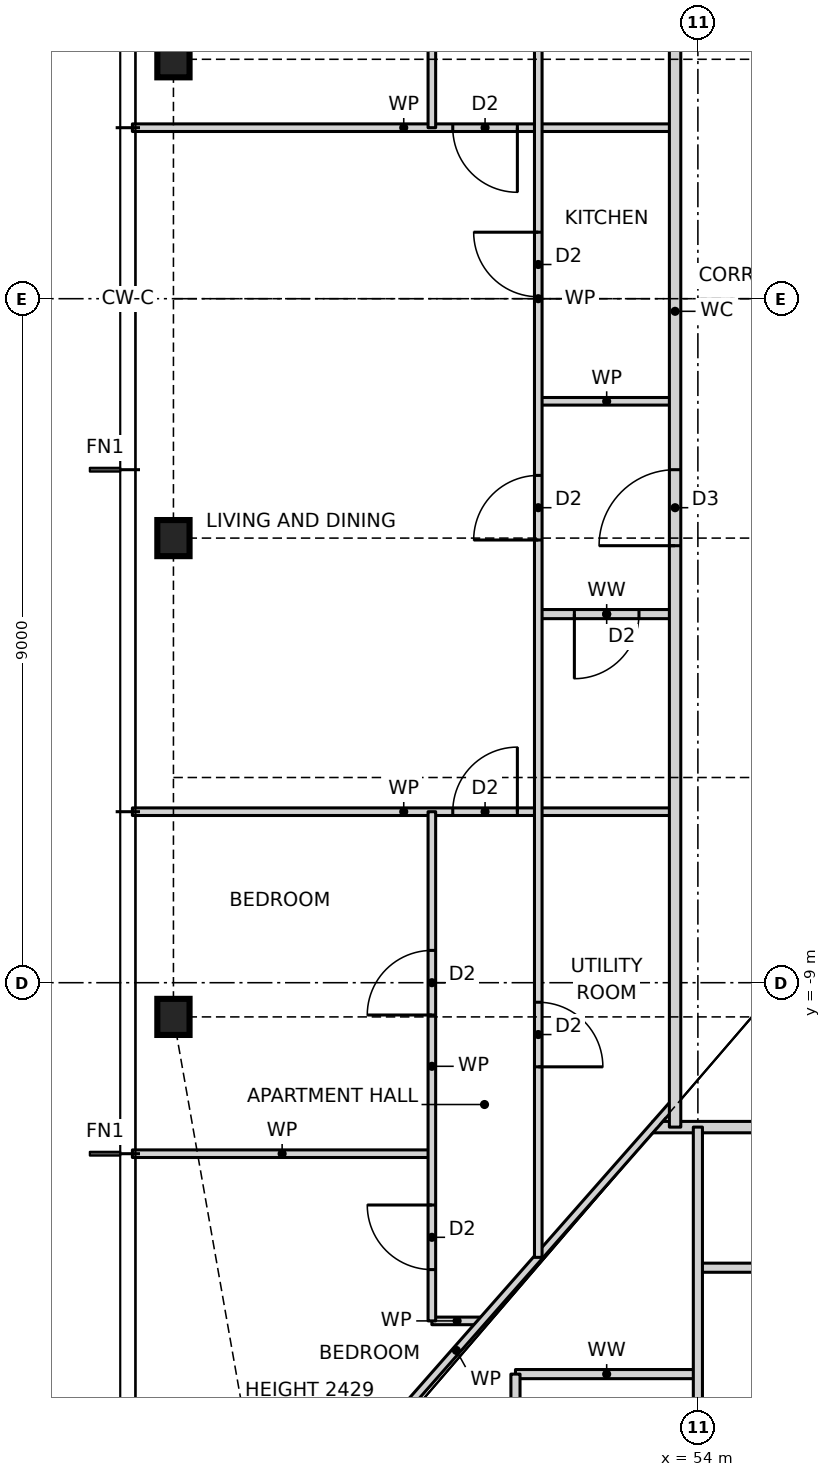
"""IFC4 building model, lengths in metres.
Left out: names, types, materials, properties, quantities, classifications, styles, units other than length and angle.
Written with IfcOpenShell. Run it as: python <this file> out.ifc"""

import sys

from ifc_helpers import new_model, si_unit, direction, frame, frame_2d, origin, origin_2d, place, context, subcontext, project, spatial, rectangle, i_section, extrude, element, fill, save


model = new_model("IFC4")
c1 = context("Model", 3, precision=1e-05, world=origin(), true_north=direction((0.0, 1.0)))
c2 = subcontext(c1, "Body", "Model", "MODEL_VIEW")
j1 = project(units=[si_unit("LENGTHUNIT", "METRE"), si_unit("PLANEANGLEUNIT", "RADIAN")], contexts=[c1])
p1 = place(None, origin())
s1 = spatial("IfcSite", under=j1, at=p1, CompositionType="ELEMENT")
p2 = place(p1, origin())
s2 = spatial("IfcBuilding", under=s1, at=p2, CompositionType="ELEMENT")
p3 = place(p2, frame((0.0, 0.0, 18.5)))
s3 = spatial("IfcBuildingStorey", under=s2, at=p3, CompositionType="ELEMENT", Elevation=18.5)
for number, where, z_axis, x_axis in (
    (1, (47.1, 3.15, 0.0), (0.0, 0.0, 1.0), (1.0, 0.0, 0.0)),
    (2, (47.1, -3.15, 0.0), (0.0, 0.0, 1.0), (1.0, 0.0, 0.0)),
    (3, (47.1, -9.45, 0.0), (0.0, 0.0, 1.0), (1.0, 0.0, 0.0)),
):
    element("IfcColumn", number, at=place(p3, frame(where, z_axis=z_axis, x_axis=x_axis)), inside=s3, PredefinedType="COLUMN", context=c2, shape_type="SweptSolid", body=[
        extrude(i_section(OverallWidth=0.424, OverallDepth=0.475, WebThickness=0.048, FlangeThickness=0.077, at=origin_2d()), origin(), (0.0, 0.0, 1.0), 3.5),
    ])
p4 = place(p3, frame((51.6, -14.15, 0.0), z_axis=(0.0, 0.0, 1.0), x_axis=(1.0, 0.0, 0.0)))
e4 = element("IfcWall", 4, at=p4, inside=s3, PredefinedType="PARTITIONING", context=c2, shape_type="SweptSolid", body=[
    extrude(rectangle(XDim=2.4, YDim=0.12, at=frame_2d((1.2, 0.0))), origin(), (0.0, 0.0, 1.0), 3.27),
])
p5 = place(p3, frame((50.5, -13.45, 0.0), z_axis=(0.0, 0.0, 1.0), x_axis=(1.0, 0.0, 0.0)))
e5 = element("IfcWall", 5, at=p5, inside=s3, PredefinedType="PARTITIONING", context=c2, shape_type="SweptSolid", body=[
    extrude(rectangle(XDim=0.664, YDim=0.1, at=frame_2d((0.332, 0.0))), origin(), (0.0, 0.0, 1.0), 3.27),
])
p6 = place(p3, frame((54.0, -12.75, 0.0), z_axis=(0.0, 0.0, 1.0), x_axis=(1.0, 0.0, 0.0)))
e6 = element("IfcWall", 6, at=p6, inside=s3, PredefinedType="PARTITIONING", context=c2, shape_type="SweptSolid", body=[
    extrude(rectangle(XDim=20.2, YDim=0.12, at=frame_2d((10.1, 0.0))), origin(), (0.0, 0.0, 1.0), 3.27),
])
p7 = place(p6, frame((1.375, 0.0, 0.0)))
e7 = element("IfcOpeningElement", 7, at=p7, cuts=e6, PredefinedType="OPENING", context=c2, shape_type="SweptSolid", body=[
    extrude(rectangle(XDim=0.85, YDim=2.1, at=frame_2d((0.425, 1.05))), frame((0.0, 0.07, 0.0), z_axis=(0.0, -1.0, 0.0), x_axis=(1.0, 0.0, 0.0)), (0.0, 0.0, 1.0), 0.14),
])
p8 = place(p6, frame((4.575, 0.0, 0.0)))
e8 = element("IfcOpeningElement", 8, at=p8, cuts=e6, PredefinedType="OPENING", context=c2, shape_type="SweptSolid", body=[
    extrude(rectangle(XDim=0.85, YDim=2.1, at=frame_2d((0.425, 1.05))), frame((0.0, 0.07, 0.0), z_axis=(0.0, -1.0, 0.0), x_axis=(1.0, 0.0, 0.0)), (0.0, 0.0, 1.0), 0.14),
])
p9 = place(p6, frame((10.725, 0.0, 0.0)))
e9 = element("IfcOpeningElement", 9, at=p9, cuts=e6, PredefinedType="OPENING", context=c2, shape_type="SweptSolid", body=[
    extrude(rectangle(XDim=0.85, YDim=2.1, at=frame_2d((0.425, 1.05))), frame((0.0, 0.07, 0.0), z_axis=(0.0, -1.0, 0.0), x_axis=(1.0, 0.0, 0.0)), (0.0, 0.0, 1.0), 0.14),
])
p10 = place(p6, frame((16.325, 0.0, 0.0)))
e10 = element("IfcOpeningElement", 10, at=p10, cuts=e6, PredefinedType="OPENING", context=c2, shape_type="SweptSolid", body=[
    extrude(rectangle(XDim=0.85, YDim=2.1, at=frame_2d((0.425, 1.05))), frame((0.0, 0.07, 0.0), z_axis=(0.0, -1.0, 0.0), x_axis=(1.0, 0.0, 0.0)), (0.0, 0.0, 1.0), 0.14),
])
p11 = place(p3, frame((46.56, -11.25, 0.0), z_axis=(0.0, 0.0, 1.0), x_axis=(1.0, 0.0, 0.0)))
e11 = element("IfcWall", 11, at=p11, inside=s3, PredefinedType="PARTITIONING", context=c2, shape_type="SweptSolid", body=[
    extrude(rectangle(XDim=3.94, YDim=0.1, at=frame_2d((1.97, 0.0))), origin(), (0.0, 0.0, 1.0), 3.27),
])
p12 = place(p3, frame((53.408, -10.9, 0.0), z_axis=(0.0, 0.0, 1.0), x_axis=(1.0, 0.0, 0.0)))
e12 = element("IfcWall", 12, at=p12, inside=s3, PredefinedType="PARTITIONING", context=c2, shape_type="SweptSolid", body=[
    extrude(rectangle(XDim=19.184, YDim=0.15, at=frame_2d((9.592, 0.0))), origin(), (0.0, 0.0, 1.0), 3.27),
])
p13 = place(p12, frame((5.092, 0.0, 0.0)))
e13 = element("IfcOpeningElement", 13, at=p13, cuts=e12, PredefinedType="OPENING", context=c2, shape_type="SweptSolid", body=[
    extrude(rectangle(XDim=1.0, YDim=2.1, at=frame_2d((0.5, 1.05))), frame((0.0, 0.085, 0.0), z_axis=(0.0, -1.0, 0.0), x_axis=(1.0, 0.0, 0.0)), (0.0, 0.0, 1.0), 0.17),
])
p14 = place(p3, frame((46.56, -6.75, 0.0), z_axis=(0.0, 0.0, 1.0), x_axis=(1.0, 0.0, 0.0)))
e14 = element("IfcWall", 14, at=p14, inside=s3, PredefinedType="PARTITIONING", context=c2, shape_type="SweptSolid", body=[
    extrude(rectangle(XDim=7.14, YDim=0.1, at=frame_2d((3.57, 0.0))), origin(), (0.0, 0.0, 1.0), 3.27),
])
p15 = place(p14, frame((4.215, 0.0, 0.0)))
e15 = element("IfcOpeningElement", 15, at=p15, cuts=e14, PredefinedType="OPENING", context=c2, shape_type="SweptSolid", body=[
    extrude(rectangle(XDim=0.85, YDim=2.1, at=frame_2d((0.425, 1.05))), frame((0.0, 0.06, 0.0), z_axis=(0.0, -1.0, 0.0), x_axis=(1.0, 0.0, 0.0)), (0.0, 0.0, 1.0), 0.12),
])
p16 = place(p3, frame((51.9, -4.15, 0.0), z_axis=(0.0, 0.0, 1.0), x_axis=(1.0, 0.0, 0.0)))
e16 = element("IfcWall", 16, at=p16, inside=s3, PredefinedType="PARTITIONING", context=c2, shape_type="SweptSolid", body=[
    extrude(rectangle(XDim=1.8, YDim=0.12, at=frame_2d((0.9, 0.0))), origin(), (0.0, 0.0, 1.0), 3.27),
])
p17 = place(p16, frame((0.475, 0.0, 0.0)))
e17 = element("IfcOpeningElement", 17, at=p17, cuts=e16, PredefinedType="OPENING", context=c2, shape_type="SweptSolid", body=[
    extrude(rectangle(XDim=0.85, YDim=2.1, at=frame_2d((0.425, 1.05))), frame((0.0, 0.07, 0.0), z_axis=(0.0, -1.0, 0.0), x_axis=(1.0, 0.0, 0.0)), (0.0, 0.0, 1.0), 0.14),
])
p18 = place(p3, frame((51.9, -1.35, 0.0), z_axis=(0.0, 0.0, 1.0), x_axis=(1.0, 0.0, 0.0)))
e18 = element("IfcWall", 18, at=p18, inside=s3, PredefinedType="PARTITIONING", context=c2, shape_type="SweptSolid", body=[
    extrude(rectangle(XDim=1.8, YDim=0.1, at=frame_2d((0.9, 0.0))), origin(), (0.0, 0.0, 1.0), 3.27),
])
p19 = place(p3, frame((46.56, 2.25, 0.0), z_axis=(0.0, 0.0, 1.0), x_axis=(1.0, 0.0, 0.0)))
e19 = element("IfcWall", 19, at=p19, inside=s3, PredefinedType="PARTITIONING", context=c2, shape_type="SweptSolid", body=[
    extrude(rectangle(XDim=7.14, YDim=0.1, at=frame_2d((3.57, 0.0))), origin(), (0.0, 0.0, 1.0), 3.27),
])
p20 = place(p19, frame((4.215, 0.0, 0.0)))
e20 = element("IfcOpeningElement", 20, at=p20, cuts=e19, PredefinedType="OPENING", context=c2, shape_type="SweptSolid", body=[
    extrude(rectangle(XDim=0.85, YDim=2.1, at=frame_2d((0.425, 1.05))), frame((0.0, 0.06, 0.0), z_axis=(0.0, -1.0, 0.0), x_axis=(1.0, 0.0, 0.0)), (0.0, 0.0, 1.0), 0.12),
])
p21 = place(p3, frame((47.944, -17.109, 0.0), z_axis=(0.0, 0.0, 1.0), x_axis=(0.660612734851, 0.750726857487, 0.0)))
e21 = element("IfcWall", 21, at=p21, inside=s3, PredefinedType="PARTITIONING", context=c2, shape_type="SweptSolid", body=[
    extrude(rectangle(XDim=8.713, YDim=0.1, at=frame_2d((4.356, 0.0))), origin(), (0.0, 0.0, 1.0), 2.429),
])
p22 = place(p3, frame((54.0, -18.69, 0.0), z_axis=(0.0, 0.0, 1.0), x_axis=(0.0, 1.0, 0.0)))
e22 = element("IfcWall", 22, at=p22, inside=s3, PredefinedType="PARTITIONING", context=c2, shape_type="SweptSolid", body=[
    extrude(rectangle(XDim=7.79, YDim=0.12, at=frame_2d((3.895, 0.0))), origin(), (0.0, 0.0, 1.0), 3.27),
])
p23 = place(p22, frame((0.99, 0.0, 0.0)))
e23 = element("IfcOpeningElement", 23, at=p23, cuts=e22, PredefinedType="OPENING", context=c2, shape_type="SweptSolid", body=[
    extrude(rectangle(XDim=0.85, YDim=2.1, at=frame_2d((0.425, 1.05))), frame((0.0, 0.07, 0.0), z_axis=(0.0, -1.0, 0.0), x_axis=(1.0, 0.0, 0.0)), (0.0, 0.0, 1.0), 0.14),
])
p24 = place(p3, frame((53.7, -10.9, 0.0), z_axis=(0.0, 0.0, 1.0), x_axis=(0.0, 1.0, 0.0)))
e24 = element("IfcWall", 24, at=p24, inside=s3, PredefinedType="PARTITIONING", context=c2, shape_type="SweptSolid", body=[
    extrude(rectangle(XDim=21.468, YDim=0.15, at=frame_2d((10.734, 0.0))), origin(), (0.0, 0.0, 1.0), 3.27),
])
p25 = place(p24, frame((7.65, 0.0, 0.0)))
e25 = element("IfcOpeningElement", 25, at=p25, cuts=e24, PredefinedType="OPENING", context=c2, shape_type="SweptSolid", body=[
    extrude(rectangle(XDim=1.0, YDim=2.1, at=frame_2d((0.5, 1.05))), frame((0.0, 0.085, 0.0), z_axis=(0.0, -1.0, 0.0), x_axis=(1.0, 0.0, 0.0)), (0.0, 0.0, 1.0), 0.17),
])
p26 = place(p3, frame((51.9, -12.614, 0.0), z_axis=(0.0, 0.0, 1.0), x_axis=(0.0, 1.0, 0.0)))
e26 = element("IfcWall", 26, at=p26, inside=s3, PredefinedType="PARTITIONING", context=c2, shape_type="SweptSolid", body=[
    extrude(rectangle(XDim=25.228, YDim=0.1, at=frame_2d((12.614, 0.0))), origin(), (0.0, 0.0, 1.0), 3.27),
])
p27 = place(p26, frame((12.639, 0.0, 0.0)))
e27 = element("IfcOpeningElement", 27, at=p27, cuts=e26, PredefinedType="OPENING", context=c2, shape_type="SweptSolid", body=[
    extrude(rectangle(XDim=0.85, YDim=2.1, at=frame_2d((0.425, 1.05))), frame((0.0, 0.06, 0.0), z_axis=(0.0, -1.0, 0.0), x_axis=(1.0, 0.0, 0.0)), (0.0, 0.0, 1.0), 0.12),
])
p28 = place(p26, frame((9.439, 0.0, 0.0)))
e28 = element("IfcOpeningElement", 28, at=p28, cuts=e26, PredefinedType="OPENING", context=c2, shape_type="SweptSolid", body=[
    extrude(rectangle(XDim=0.85, YDim=2.1, at=frame_2d((0.425, 1.05))), frame((0.0, 0.06, 0.0), z_axis=(0.0, -1.0, 0.0), x_axis=(1.0, 0.0, 0.0)), (0.0, 0.0, 1.0), 0.12),
])
p29 = place(p26, frame((16.639, 0.0, 0.0)))
e29 = element("IfcOpeningElement", 29, at=p29, cuts=e26, PredefinedType="OPENING", context=c2, shape_type="SweptSolid", body=[
    extrude(rectangle(XDim=0.85, YDim=2.1, at=frame_2d((0.425, 1.05))), frame((0.0, 0.06, 0.0), z_axis=(0.0, -1.0, 0.0), x_axis=(1.0, 0.0, 0.0)), (0.0, 0.0, 1.0), 0.12),
])
p30 = place(p26, frame((21.821, 0.0, 0.0)))
e30 = element("IfcOpeningElement", 30, at=p30, cuts=e26, PredefinedType="OPENING", context=c2, shape_type="SweptSolid", body=[
    extrude(rectangle(XDim=0.85, YDim=2.1, at=frame_2d((0.425, 1.05))), frame((0.0, 0.06, 0.0), z_axis=(0.0, -1.0, 0.0), x_axis=(1.0, 0.0, 0.0)), (0.0, 0.0, 1.0), 0.12),
])
p31 = place(p26, frame((2.507, 0.0, 0.0)))
e31 = element("IfcOpeningElement", 31, at=p31, cuts=e26, PredefinedType="OPENING", context=c2, shape_type="SweptSolid", body=[
    extrude(rectangle(XDim=0.85, YDim=2.1, at=frame_2d((0.425, 1.05))), frame((0.0, 0.06, 0.0), z_axis=(0.0, -1.0, 0.0), x_axis=(1.0, 0.0, 0.0)), (0.0, 0.0, 1.0), 0.12),
])
p32 = place(p3, frame((51.6, -16.75, 0.0), z_axis=(0.0, 0.0, 1.0), x_axis=(0.0, 1.0, 0.0)))
e32 = element("IfcWall", 32, at=p32, inside=s3, PredefinedType="PARTITIONING", context=c2, shape_type="SweptSolid", body=[
    extrude(rectangle(XDim=2.6, YDim=0.12, at=frame_2d((1.3, 0.0))), origin(), (0.0, 0.0, 1.0), 3.27),
])
p33 = place(p32, frame((0.875, 0.0, 0.0)))
e33 = element("IfcOpeningElement", 33, at=p33, cuts=e32, PredefinedType="OPENING", context=c2, shape_type="SweptSolid", body=[
    extrude(rectangle(XDim=0.85, YDim=2.1, at=frame_2d((0.425, 1.05))), frame((0.0, 0.07, 0.0), z_axis=(0.0, -1.0, 0.0), x_axis=(1.0, 0.0, 0.0)), (0.0, 0.0, 1.0), 0.14),
])
p34 = place(p3, frame((50.5, -13.45, 0.0), z_axis=(0.0, 0.0, 1.0), x_axis=(0.0, 1.0, 0.0)))
e34 = element("IfcWall", 34, at=p34, inside=s3, PredefinedType="PARTITIONING", context=c2, shape_type="SweptSolid", body=[
    extrude(rectangle(XDim=6.7, YDim=0.1, at=frame_2d((3.35, 0.0))), origin(), (0.0, 0.0, 1.0), 3.27),
])
p35 = place(p34, frame((4.025, 0.0, 0.0)))
e35 = element("IfcOpeningElement", 35, at=p35, cuts=e34, PredefinedType="OPENING", context=c2, shape_type="SweptSolid", body=[
    extrude(rectangle(XDim=0.85, YDim=2.1, at=frame_2d((0.425, 1.05))), frame((0.0, 0.06, 0.0), z_axis=(0.0, -1.0, 0.0), x_axis=(1.0, 0.0, 0.0)), (0.0, 0.0, 1.0), 0.12),
])
p36 = place(p34, frame((0.675, 0.0, 0.0)))
e36 = element("IfcOpeningElement", 36, at=p36, cuts=e34, PredefinedType="OPENING", context=c2, shape_type="SweptSolid", body=[
    extrude(rectangle(XDim=0.85, YDim=2.1, at=frame_2d((0.425, 1.05))), frame((0.0, 0.06, 0.0), z_axis=(0.0, -1.0, 0.0), x_axis=(1.0, 0.0, 0.0)), (0.0, 0.0, 1.0), 0.12),
])
p37 = place(p3, frame((50.5, 2.25, 0.0), z_axis=(0.0, 0.0, 1.0), x_axis=(0.0, 1.0, 0.0)))
e37 = element("IfcWall", 37, at=p37, inside=s3, PredefinedType="PARTITIONING", context=c2, shape_type="SweptSolid", body=[
    extrude(rectangle(XDim=11.2, YDim=0.1, at=frame_2d((5.6, 0.0))), origin(), (0.0, 0.0, 1.0), 3.27),
])
p38 = place(p37, frame((1.825, 0.0, 0.0)))
e38 = element("IfcOpeningElement", 38, at=p38, cuts=e37, PredefinedType="OPENING", context=c2, shape_type="SweptSolid", body=[
    extrude(rectangle(XDim=0.85, YDim=2.1, at=frame_2d((0.425, 1.05))), frame((0.0, 0.06, 0.0), z_axis=(0.0, -1.0, 0.0), x_axis=(1.0, 0.0, 0.0)), (0.0, 0.0, 1.0), 0.12),
])
p39 = place(p37, frame((5.125, 0.0, 0.0)))
e39 = element("IfcOpeningElement", 39, at=p39, cuts=e37, PredefinedType="OPENING", context=c2, shape_type="SweptSolid", body=[
    extrude(rectangle(XDim=0.85, YDim=2.1, at=frame_2d((0.425, 1.05))), frame((0.0, 0.06, 0.0), z_axis=(0.0, -1.0, 0.0), x_axis=(1.0, 0.0, 0.0)), (0.0, 0.0, 1.0), 0.12),
])
p40 = place(p37, frame((9.675, 0.0, 0.0)))
e40 = element("IfcOpeningElement", 40, at=p40, cuts=e37, PredefinedType="OPENING", context=c2, shape_type="SweptSolid", body=[
    extrude(rectangle(XDim=0.85, YDim=2.1, at=frame_2d((0.425, 1.05))), frame((0.0, 0.06, 0.0), z_axis=(0.0, -1.0, 0.0), x_axis=(1.0, 0.0, 0.0)), (0.0, 0.0, 1.0), 0.12),
])
p41 = place(p27, origin())
e41 = element("IfcDoor", 41, at=p41, inside=s3, OperationType="SINGLE_SWING_RIGHT", PredefinedType="DOOR", context=c2, shape_type="SweptSolid", body=[
    extrude(rectangle(XDim=0.85, YDim=2.1, at=frame_2d((0.425, 1.05))), frame((0.0, 0.025, 0.0), z_axis=(0.0, -1.0, 0.0), x_axis=(1.0, 0.0, 0.0)), (0.0, 0.0, 1.0), 0.05),
])
fill(e27, e41)
p42 = place(p25, origin())
e42 = element("IfcDoor", 42, at=p42, inside=s3, OperationType="SINGLE_SWING_LEFT", PredefinedType="DOOR", context=c2, shape_type="SweptSolid", body=[
    extrude(rectangle(XDim=1.0, YDim=2.1, at=frame_2d((0.5, 1.05))), frame((0.0, 0.025, 0.0), z_axis=(0.0, -1.0, 0.0), x_axis=(1.0, 0.0, 0.0)), (0.0, 0.0, 1.0), 0.05),
])
fill(e25, e42)
p43 = place(p28, origin())
e43 = element("IfcDoor", 43, at=p43, inside=s3, OperationType="SINGLE_SWING_LEFT", PredefinedType="DOOR", context=c2, shape_type="SweptSolid", body=[
    extrude(rectangle(XDim=0.85, YDim=2.1, at=frame_2d((0.425, 1.05))), frame((0.0, 0.025, 0.0), z_axis=(0.0, -1.0, 0.0), x_axis=(1.0, 0.0, 0.0)), (0.0, 0.0, 1.0), 0.05),
])
fill(e28, e43)
p44 = place(p17, frame((0.85, 0.0, 0.0), z_axis=(0.0, 0.0, 1.0), x_axis=(-1.0, 0.0, 0.0)))
e44 = element("IfcDoor", 44, at=p44, inside=s3, OperationType="SINGLE_SWING_RIGHT", PredefinedType="DOOR", context=c2, shape_type="SweptSolid", body=[
    extrude(rectangle(XDim=0.85, YDim=2.1, at=frame_2d((0.425, 1.05))), frame((0.0, 0.025, 0.0), z_axis=(0.0, -1.0, 0.0), x_axis=(1.0, 0.0, 0.0)), (0.0, 0.0, 1.0), 0.05),
])
fill(e17, e44)
p45 = place(p20, frame((0.85, 0.0, 0.0), z_axis=(0.0, 0.0, 1.0), x_axis=(-1.0, 0.0, 0.0)))
e45 = element("IfcDoor", 45, at=p45, inside=s3, OperationType="SINGLE_SWING_LEFT", PredefinedType="DOOR", context=c2, shape_type="SweptSolid", body=[
    extrude(rectangle(XDim=0.85, YDim=2.1, at=frame_2d((0.425, 1.05))), frame((0.0, 0.025, 0.0), z_axis=(0.0, -1.0, 0.0), x_axis=(1.0, 0.0, 0.0)), (0.0, 0.0, 1.0), 0.05),
])
fill(e20, e45)
p46 = place(p15, origin())
e46 = element("IfcDoor", 46, at=p46, inside=s3, OperationType="SINGLE_SWING_RIGHT", PredefinedType="DOOR", context=c2, shape_type="SweptSolid", body=[
    extrude(rectangle(XDim=0.85, YDim=2.1, at=frame_2d((0.425, 1.05))), frame((0.0, 0.025, 0.0), z_axis=(0.0, -1.0, 0.0), x_axis=(1.0, 0.0, 0.0)), (0.0, 0.0, 1.0), 0.05),
])
fill(e15, e46)
p47 = place(p35, origin())
e47 = element("IfcDoor", 47, at=p47, inside=s3, OperationType="SINGLE_SWING_LEFT", PredefinedType="DOOR", context=c2, shape_type="SweptSolid", body=[
    extrude(rectangle(XDim=0.85, YDim=2.1, at=frame_2d((0.425, 1.05))), frame((0.0, 0.025, 0.0), z_axis=(0.0, -1.0, 0.0), x_axis=(1.0, 0.0, 0.0)), (0.0, 0.0, 1.0), 0.05),
])
fill(e35, e47)
p48 = place(p36, origin())
e48 = element("IfcDoor", 48, at=p48, inside=s3, OperationType="SINGLE_SWING_RIGHT", PredefinedType="DOOR", context=c2, shape_type="SweptSolid", body=[
    extrude(rectangle(XDim=0.85, YDim=2.1, at=frame_2d((0.425, 1.05))), frame((0.0, 0.025, 0.0), z_axis=(0.0, -1.0, 0.0), x_axis=(1.0, 0.0, 0.0)), (0.0, 0.0, 1.0), 0.05),
])
fill(e36, e48)
p49 = place(p31, frame((0.85, 0.0, 0.0), z_axis=(0.0, 0.0, 1.0), x_axis=(-1.0, 0.0, 0.0)))
e49 = element("IfcDoor", 49, at=p49, inside=s3, OperationType="SINGLE_SWING_RIGHT", PredefinedType="DOOR", context=c2, shape_type="SweptSolid", body=[
    extrude(rectangle(XDim=0.85, YDim=2.1, at=frame_2d((0.425, 1.05))), frame((0.0, 0.025, 0.0), z_axis=(0.0, -1.0, 0.0), x_axis=(1.0, 0.0, 0.0)), (0.0, 0.0, 1.0), 0.05),
])
fill(e31, e49)
save(model, sys.argv[1])
